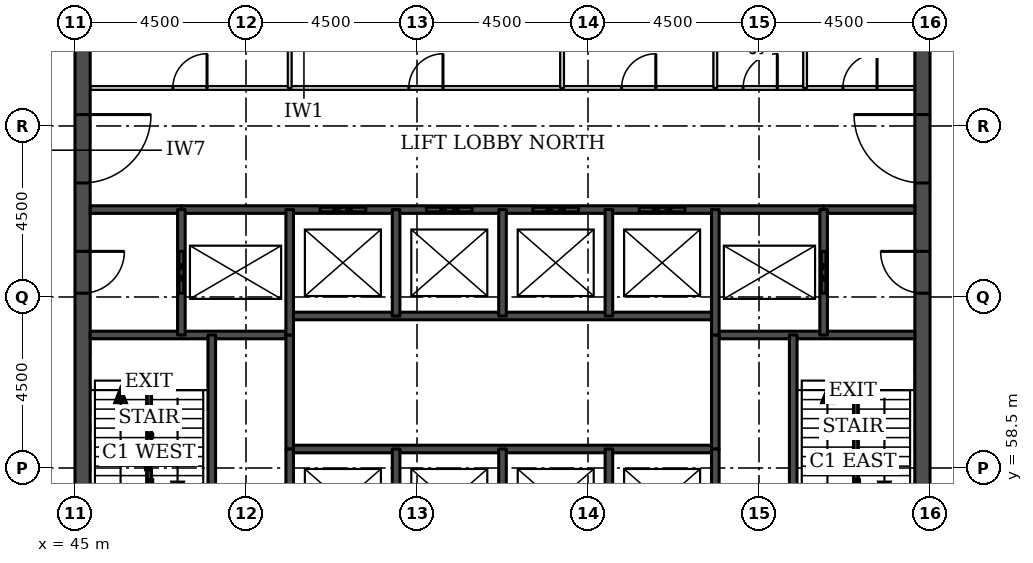
"""IFC4 building model, lengths in metres.
Left out: names, types, materials, properties, quantities, classifications, styles, units other than length and angle.
Written with IfcOpenShell. Run it as: python <this file> out.ifc"""

import sys

from ifc_helpers import new_model, si_unit, direction, frame, frame_2d, origin, place, context, subcontext, project, spatial, rectangle, extrude, element, fill, save


model = new_model("IFC4")
c1 = context("Model", 3, precision=1e-05, world=origin(), true_north=direction((0.0, 1.0)))
c2 = subcontext(c1, "Body", "Model", "MODEL_VIEW")
j1 = project(units=[si_unit("LENGTHUNIT", "METRE"), si_unit("PLANEANGLEUNIT", "RADIAN")], contexts=[c1])
p1 = place(None, origin())
s1 = spatial("IfcSite", under=j1, at=p1, CompositionType="ELEMENT")
p2 = place(p1, origin())
s2 = spatial("IfcBuilding", under=s1, at=p2, CompositionType="ELEMENT")
p3 = place(p2, frame((0.0, 0.0, 199.5)))
s3 = spatial("IfcBuildingStorey", under=s2, at=p3, CompositionType="ELEMENT", Elevation=199.5)
p4 = place(p3, frame((45.2, 49.5, 0.0), z_axis=(0.0, 0.0, 1.0), x_axis=(0.0, 1.0, 0.0)))
e1 = element("IfcWall", 1, at=p4, inside=s3, PredefinedType="SHEAR", context=c2, shape_type="SweptSolid", body=[
    extrude(rectangle(XDim=22.5, YDim=0.4, at=frame_2d((11.25, 0.0))), origin(), (0.0, 0.0, 1.0), 3.7),
])
p5 = place(p4, frame((4.2, 0.0, 0.0)))
e2 = element("IfcOpeningElement", 2, at=p5, cuts=e1, PredefinedType="OPENING", context=c2, shape_type="SweptSolid", body=[
    extrude(rectangle(XDim=1.8, YDim=2.1, at=frame_2d((0.9, 1.05))), frame((0.0, 0.21, 0.0), z_axis=(0.0, -1.0, 0.0), x_axis=(1.0, 0.0, 0.0)), (0.0, 0.0, 1.0), 0.42),
])
p6 = place(p4, frame((6.9, 0.0, 0.0)))
e3 = element("IfcOpeningElement", 3, at=p6, cuts=e1, PredefinedType="OPENING", context=c2, shape_type="SweptSolid", body=[
    extrude(rectangle(XDim=1.1, YDim=2.1, at=frame_2d((0.55, 1.05))), frame((0.0, 0.21, 0.0), z_axis=(0.0, -1.0, 0.0), x_axis=(1.0, 0.0, 0.0)), (0.0, 0.0, 1.0), 0.42),
])
p7 = place(p4, frame((13.6, 0.0, 0.0)))
e4 = element("IfcOpeningElement", 4, at=p7, cuts=e1, PredefinedType="OPENING", context=c2, shape_type="SweptSolid", body=[
    extrude(rectangle(XDim=1.1, YDim=2.1, at=frame_2d((0.55, 1.05))), frame((0.0, 0.21, 0.0), z_axis=(0.0, -1.0, 0.0), x_axis=(1.0, 0.0, 0.0)), (0.0, 0.0, 1.0), 0.42),
])
p8 = place(p4, frame((16.5, 0.0, 0.0)))
e5 = element("IfcOpeningElement", 5, at=p8, cuts=e1, PredefinedType="OPENING", context=c2, shape_type="SweptSolid", body=[
    extrude(rectangle(XDim=1.8, YDim=2.1, at=frame_2d((0.9, 1.05))), frame((0.0, 0.21, 0.0), z_axis=(0.0, -1.0, 0.0), x_axis=(1.0, 0.0, 0.0)), (0.0, 0.0, 1.0), 0.42),
])
p9 = place(p3, frame((67.3, 49.5, 0.0), z_axis=(0.0, 0.0, 1.0), x_axis=(0.0, 1.0, 0.0)))
e6 = element("IfcWall", 6, at=p9, inside=s3, PredefinedType="SHEAR", context=c2, shape_type="SweptSolid", body=[
    extrude(rectangle(XDim=22.5, YDim=0.4, at=frame_2d((11.25, 0.0))), origin(), (0.0, 0.0, 1.0), 3.7),
])
p10 = place(p9, frame((4.2, 0.0, 0.0)))
e7 = element("IfcOpeningElement", 7, at=p10, cuts=e6, PredefinedType="OPENING", context=c2, shape_type="SweptSolid", body=[
    extrude(rectangle(XDim=1.8, YDim=2.1, at=frame_2d((0.9, 1.05))), frame((0.0, 0.21, 0.0), z_axis=(0.0, -1.0, 0.0), x_axis=(1.0, 0.0, 0.0)), (0.0, 0.0, 1.0), 0.42),
])
p11 = place(p9, frame((6.9, 0.0, 0.0)))
e8 = element("IfcOpeningElement", 8, at=p11, cuts=e6, PredefinedType="OPENING", context=c2, shape_type="SweptSolid", body=[
    extrude(rectangle(XDim=1.1, YDim=2.1, at=frame_2d((0.55, 1.05))), frame((0.0, 0.21, 0.0), z_axis=(0.0, -1.0, 0.0), x_axis=(1.0, 0.0, 0.0)), (0.0, 0.0, 1.0), 0.42),
])
p12 = place(p9, frame((13.6, 0.0, 0.0)))
e9 = element("IfcOpeningElement", 9, at=p12, cuts=e6, PredefinedType="OPENING", context=c2, shape_type="SweptSolid", body=[
    extrude(rectangle(XDim=1.1, YDim=2.1, at=frame_2d((0.55, 1.05))), frame((0.0, 0.21, 0.0), z_axis=(0.0, -1.0, 0.0), x_axis=(1.0, 0.0, 0.0)), (0.0, 0.0, 1.0), 0.42),
])
p13 = place(p9, frame((16.5, 0.0, 0.0)))
e10 = element("IfcOpeningElement", 10, at=p13, cuts=e6, PredefinedType="OPENING", context=c2, shape_type="SweptSolid", body=[
    extrude(rectangle(XDim=1.8, YDim=2.1, at=frame_2d((0.9, 1.05))), frame((0.0, 0.21, 0.0), z_axis=(0.0, -1.0, 0.0), x_axis=(1.0, 0.0, 0.0)), (0.0, 0.0, 1.0), 0.42),
])
p14 = place(p3, frame((50.65, 59.0, 0.0), z_axis=(0.0, 0.0, 1.0), x_axis=(1.0, 0.0, 0.0)))
e11 = element("IfcWall", 11, at=p14, inside=s3, PredefinedType="SOLIDWALL", context=c2, shape_type="SweptSolid", body=[
    extrude(rectangle(XDim=11.2, YDim=0.2, at=frame_2d((5.6, 0.0))), origin(), (0.0, 0.0, 1.0), 3.7),
])
for number, where, z_axis, x_axis in (
    (12, (45.4, 62.0, 0.0), (0.0, 0.0, 1.0), (1.0, 0.0, 0.0)),
    (13, (61.85, 62.0, 0.0), (0.0, 0.0, 1.0), (1.0, 0.0, 0.0)),
):
    element("IfcWall", number, at=place(p3, frame(where, z_axis=z_axis, x_axis=x_axis)), inside=s3, PredefinedType="SOLIDWALL", context=c2, shape_type="SweptSolid", body=[
        extrude(rectangle(XDim=5.25, YDim=0.2, at=frame_2d((2.625, 0.0))), origin(), (0.0, 0.0, 1.0), 3.55),
    ])
p15 = place(p3, frame((50.65, 62.5, 0.0), z_axis=(0.0, 0.0, 1.0), x_axis=(1.0, 0.0, 0.0)))
e14 = element("IfcWall", 14, at=p15, inside=s3, PredefinedType="SOLIDWALL", context=c2, shape_type="SweptSolid", body=[
    extrude(rectangle(XDim=11.2, YDim=0.2, at=frame_2d((5.6, 0.0))), origin(), (0.0, 0.0, 1.0), 3.7),
])
for number, where, z_axis, x_axis in (
    (15, (45.4, 65.3, 0.0), (0.0, 0.0, 1.0), (1.0, 0.0, 0.0)),
    (16, (64.7, 65.3, 0.0), (0.0, 0.0, 1.0), (1.0, 0.0, 0.0)),
):
    element("IfcWall", number, at=place(p3, frame(where, z_axis=z_axis, x_axis=x_axis)), inside=s3, PredefinedType="SOLIDWALL", context=c2, shape_type="SweptSolid", body=[
        extrude(rectangle(XDim=2.4, YDim=0.2, at=frame_2d((1.2, 0.0))), origin(), (0.0, 0.0, 1.0), 3.55),
    ])
p16 = place(p3, frame((47.8, 65.3, 0.0), z_axis=(0.0, 0.0, 1.0), x_axis=(1.0, 0.0, 0.0)))
e17 = element("IfcWall", 17, at=p16, inside=s3, PredefinedType="SOLIDWALL", context=c2, shape_type="SweptSolid", body=[
    extrude(rectangle(XDim=16.9, YDim=0.2, at=frame_2d((8.45, 0.0))), origin(), (0.0, 0.0, 1.0), 3.55),
])
p17 = place(p16, frame((3.65, 0.0, 0.0)))
e18 = element("IfcOpeningElement", 18, at=p17, cuts=e17, PredefinedType="OPENING", context=c2, shape_type="SweptSolid", body=[
    extrude(rectangle(XDim=1.2, YDim=2.1, at=frame_2d((0.6, 1.05))), frame((0.0, 0.11, 0.0), z_axis=(0.0, -1.0, 0.0), x_axis=(1.0, 0.0, 0.0)), (0.0, 0.0, 1.0), 0.22),
])
p18 = place(p16, frame((6.45, 0.0, 0.0)))
e19 = element("IfcOpeningElement", 19, at=p18, cuts=e17, PredefinedType="OPENING", context=c2, shape_type="SweptSolid", body=[
    extrude(rectangle(XDim=1.2, YDim=2.1, at=frame_2d((0.6, 1.05))), frame((0.0, 0.11, 0.0), z_axis=(0.0, -1.0, 0.0), x_axis=(1.0, 0.0, 0.0)), (0.0, 0.0, 1.0), 0.22),
])
p19 = place(p16, frame((9.25, 0.0, 0.0)))
e20 = element("IfcOpeningElement", 20, at=p19, cuts=e17, PredefinedType="OPENING", context=c2, shape_type="SweptSolid", body=[
    extrude(rectangle(XDim=1.2, YDim=2.1, at=frame_2d((0.6, 1.05))), frame((0.0, 0.11, 0.0), z_axis=(0.0, -1.0, 0.0), x_axis=(1.0, 0.0, 0.0)), (0.0, 0.0, 1.0), 0.22),
])
p20 = place(p16, frame((12.05, 0.0, 0.0)))
e21 = element("IfcOpeningElement", 21, at=p20, cuts=e17, PredefinedType="OPENING", context=c2, shape_type="SweptSolid", body=[
    extrude(rectangle(XDim=1.2, YDim=2.1, at=frame_2d((0.6, 1.05))), frame((0.0, 0.11, 0.0), z_axis=(0.0, -1.0, 0.0), x_axis=(1.0, 0.0, 0.0)), (0.0, 0.0, 1.0), 0.22),
])
p21 = place(p3, frame((45.4, 68.5, 0.0), z_axis=(0.0, 0.0, 1.0), x_axis=(1.0, 0.0, 0.0)))
e22 = element("IfcWall", 22, at=p21, inside=s3, PredefinedType="PARTITIONING", context=c2, shape_type="SweptSolid", body=[
    extrude(rectangle(XDim=21.7, YDim=0.1, at=frame_2d((10.85, 0.0))), origin(), (0.0, 0.0, 1.0), 3.55),
])
p22 = place(p21, frame((19.806, 0.0, 0.0)))
e23 = element("IfcOpeningElement", 23, at=p22, cuts=e22, PredefinedType="OPENING", context=c2, shape_type="SweptSolid", body=[
    extrude(rectangle(XDim=0.9, YDim=2.1, at=frame_2d((0.45, 1.05))), frame((0.0, 0.06, 0.0), z_axis=(0.0, -1.0, 0.0), x_axis=(1.0, 0.0, 0.0)), (0.0, 0.0, 1.0), 0.12),
])
p23 = place(p21, frame((17.181, 0.0, 0.0)))
e24 = element("IfcOpeningElement", 24, at=p23, cuts=e22, PredefinedType="OPENING", context=c2, shape_type="SweptSolid", body=[
    extrude(rectangle(XDim=0.9, YDim=2.1, at=frame_2d((0.45, 1.05))), frame((0.0, 0.06, 0.0), z_axis=(0.0, -1.0, 0.0), x_axis=(1.0, 0.0, 0.0)), (0.0, 0.0, 1.0), 0.12),
])
p24 = place(p21, frame((2.175, 0.0, 0.0)))
e25 = element("IfcOpeningElement", 25, at=p24, cuts=e22, PredefinedType="OPENING", context=c2, shape_type="SweptSolid", body=[
    extrude(rectangle(XDim=0.9, YDim=2.1, at=frame_2d((0.45, 1.05))), frame((0.0, 0.06, 0.0), z_axis=(0.0, -1.0, 0.0), x_axis=(1.0, 0.0, 0.0)), (0.0, 0.0, 1.0), 0.12),
])
p25 = place(p21, frame((13.984, 0.0, 0.0)))
e26 = element("IfcOpeningElement", 26, at=p25, cuts=e22, PredefinedType="OPENING", context=c2, shape_type="SweptSolid", body=[
    extrude(rectangle(XDim=0.9, YDim=2.1, at=frame_2d((0.45, 1.05))), frame((0.0, 0.06, 0.0), z_axis=(0.0, -1.0, 0.0), x_axis=(1.0, 0.0, 0.0)), (0.0, 0.0, 1.0), 0.12),
])
p26 = place(p21, frame((8.384, 0.0, 0.0)))
e27 = element("IfcOpeningElement", 27, at=p26, cuts=e22, PredefinedType="OPENING", context=c2, shape_type="SweptSolid", body=[
    extrude(rectangle(XDim=0.9, YDim=2.1, at=frame_2d((0.45, 1.05))), frame((0.0, 0.06, 0.0), z_axis=(0.0, -1.0, 0.0), x_axis=(1.0, 0.0, 0.0)), (0.0, 0.0, 1.0), 0.12),
])
p27 = place(p3, frame((47.8, 62.0, 0.0), z_axis=(0.0, 0.0, 1.0), x_axis=(0.0, 1.0, 0.0)))
e28 = element("IfcWall", 28, at=p27, inside=s3, PredefinedType="SOLIDWALL", context=c2, shape_type="SweptSolid", body=[
    extrude(rectangle(XDim=3.3, YDim=0.2, at=frame_2d((1.65, 0.0))), origin(), (0.0, 0.0, 1.0), 3.55),
])
p28 = place(p27, frame((1.1, 0.0, 0.0)))
e29 = element("IfcOpeningElement", 29, at=p28, cuts=e28, PredefinedType="OPENING", context=c2, shape_type="SweptSolid", body=[
    extrude(rectangle(XDim=1.1, YDim=2.1, at=frame_2d((0.55, 1.05))), frame((0.0, 0.11, 0.0), z_axis=(0.0, -1.0, 0.0), x_axis=(1.0, 0.0, 0.0)), (0.0, 0.0, 1.0), 0.22),
])
p29 = place(p3, frame((48.6, 56.2, 0.0), z_axis=(0.0, 0.0, 1.0), x_axis=(0.0, 1.0, 0.0)))
e30 = element("IfcWall", 30, at=p29, inside=s3, PredefinedType="SOLIDWALL", context=c2, shape_type="SweptSolid", body=[
    extrude(rectangle(XDim=5.8, YDim=0.2, at=frame_2d((2.9, 0.0))), origin(), (0.0, 0.0, 1.0), 3.55),
])
p30 = place(p3, frame((50.65, 68.5, 0.0), z_axis=(0.0, 0.0, 1.0), x_axis=(0.0, 1.0, 0.0)))
e31 = element("IfcWall", 31, at=p30, inside=s3, PredefinedType="PARTITIONING", context=c2, shape_type="SweptSolid", body=[
    extrude(rectangle(XDim=3.1, YDim=0.1, at=frame_2d((1.55, 0.0))), origin(), (0.0, 0.0, 1.0), 3.55),
])
p31 = place(p3, frame((50.65, 59.0, 0.0), z_axis=(0.0, 0.0, 1.0), x_axis=(0.0, 1.0, 0.0)))
e32 = element("IfcWall", 32, at=p31, inside=s3, PredefinedType="SOLIDWALL", context=c2, shape_type="SweptSolid", body=[
    extrude(rectangle(XDim=3.0, YDim=0.2, at=frame_2d((1.5, 0.0))), origin(), (0.0, 0.0, 1.0), 3.7),
])
p32 = place(p3, frame((50.65, 56.2, 0.0), z_axis=(0.0, 0.0, 1.0), x_axis=(0.0, 1.0, 0.0)))
e33 = element("IfcWall", 33, at=p32, inside=s3, PredefinedType="SOLIDWALL", context=c2, shape_type="SweptSolid", body=[
    extrude(rectangle(XDim=2.8, YDim=0.2, at=frame_2d((1.4, 0.0))), origin(), (0.0, 0.0, 1.0), 3.55),
])
p33 = place(p3, frame((50.65, 62.0, 0.0), z_axis=(0.0, 0.0, 1.0), x_axis=(0.0, 1.0, 0.0)))
e34 = element("IfcWall", 34, at=p33, inside=s3, PredefinedType="SOLIDWALL", context=c2, shape_type="SweptSolid", body=[
    extrude(rectangle(XDim=3.3, YDim=0.2, at=frame_2d((1.65, 0.0))), origin(), (0.0, 0.0, 1.0), 3.55),
])
for number, where, z_axis, x_axis in (
    (35, (53.45, 56.2, 0.0), (0.0, 0.0, 1.0), (0.0, 1.0, 0.0)),
    (36, (53.45, 62.5, 0.0), (0.0, 0.0, 1.0), (0.0, 1.0, 0.0)),
    (37, (56.25, 56.2, 0.0), (0.0, 0.0, 1.0), (0.0, 1.0, 0.0)),
    (38, (56.25, 62.5, 0.0), (0.0, 0.0, 1.0), (0.0, 1.0, 0.0)),
):
    element("IfcWall", number, at=place(p3, frame(where, z_axis=z_axis, x_axis=x_axis)), inside=s3, PredefinedType="SOLIDWALL", context=c2, shape_type="SweptSolid", body=[
        extrude(rectangle(XDim=2.8, YDim=0.2, at=frame_2d((1.4, 0.0))), origin(), (0.0, 0.0, 1.0), 3.55),
    ])
p34 = place(p3, frame((57.818, 68.5, 0.0), z_axis=(0.0, 0.0, 1.0), x_axis=(0.0, 1.0, 0.0)))
e39 = element("IfcWall", 39, at=p34, inside=s3, PredefinedType="PARTITIONING", context=c2, shape_type="SweptSolid", body=[
    extrude(rectangle(XDim=3.1, YDim=0.1, at=frame_2d((1.55, 0.0))), origin(), (0.0, 0.0, 1.0), 3.55),
])
for number, where, z_axis, x_axis in (
    (40, (59.05, 56.2, 0.0), (0.0, 0.0, 1.0), (0.0, 1.0, 0.0)),
    (41, (59.05, 62.5, 0.0), (0.0, 0.0, 1.0), (0.0, 1.0, 0.0)),
):
    element("IfcWall", number, at=place(p3, frame(where, z_axis=z_axis, x_axis=x_axis)), inside=s3, PredefinedType="SOLIDWALL", context=c2, shape_type="SweptSolid", body=[
        extrude(rectangle(XDim=2.8, YDim=0.2, at=frame_2d((1.4, 0.0))), origin(), (0.0, 0.0, 1.0), 3.55),
    ])
p35 = place(p3, frame((61.85, 68.5, 0.0), z_axis=(0.0, 0.0, 1.0), x_axis=(0.0, 1.0, 0.0)))
e42 = element("IfcWall", 42, at=p35, inside=s3, PredefinedType="PARTITIONING", context=c2, shape_type="SweptSolid", body=[
    extrude(rectangle(XDim=3.1, YDim=0.1, at=frame_2d((1.55, 0.0))), origin(), (0.0, 0.0, 1.0), 3.55),
])
p36 = place(p3, frame((61.85, 59.0, 0.0), z_axis=(0.0, 0.0, 1.0), x_axis=(0.0, 1.0, 0.0)))
e43 = element("IfcWall", 43, at=p36, inside=s3, PredefinedType="SOLIDWALL", context=c2, shape_type="SweptSolid", body=[
    extrude(rectangle(XDim=3.0, YDim=0.2, at=frame_2d((1.5, 0.0))), origin(), (0.0, 0.0, 1.0), 3.7),
])
p37 = place(p3, frame((61.85, 56.2, 0.0), z_axis=(0.0, 0.0, 1.0), x_axis=(0.0, 1.0, 0.0)))
e44 = element("IfcWall", 44, at=p37, inside=s3, PredefinedType="SOLIDWALL", context=c2, shape_type="SweptSolid", body=[
    extrude(rectangle(XDim=2.8, YDim=0.2, at=frame_2d((1.4, 0.0))), origin(), (0.0, 0.0, 1.0), 3.55),
])
p38 = place(p3, frame((61.85, 62.0, 0.0), z_axis=(0.0, 0.0, 1.0), x_axis=(0.0, 1.0, 0.0)))
e45 = element("IfcWall", 45, at=p38, inside=s3, PredefinedType="SOLIDWALL", context=c2, shape_type="SweptSolid", body=[
    extrude(rectangle(XDim=3.3, YDim=0.2, at=frame_2d((1.65, 0.0))), origin(), (0.0, 0.0, 1.0), 3.55),
])
p39 = place(p3, frame((63.9, 56.2, 0.0), z_axis=(0.0, 0.0, 1.0), x_axis=(0.0, 1.0, 0.0)))
e46 = element("IfcWall", 46, at=p39, inside=s3, PredefinedType="SOLIDWALL", context=c2, shape_type="SweptSolid", body=[
    extrude(rectangle(XDim=5.8, YDim=0.2, at=frame_2d((2.9, 0.0))), origin(), (0.0, 0.0, 1.0), 3.55),
])
p40 = place(p3, frame((64.212, 68.5, 0.0), z_axis=(0.0, 0.0, 1.0), x_axis=(0.0, 1.0, 0.0)))
e47 = element("IfcWall", 47, at=p40, inside=s3, PredefinedType="PARTITIONING", context=c2, shape_type="SweptSolid", body=[
    extrude(rectangle(XDim=3.1, YDim=0.1, at=frame_2d((1.55, 0.0))), origin(), (0.0, 0.0, 1.0), 3.55),
])
p41 = place(p3, frame((64.7, 62.0, 0.0), z_axis=(0.0, 0.0, 1.0), x_axis=(0.0, 1.0, 0.0)))
e48 = element("IfcWall", 48, at=p41, inside=s3, PredefinedType="SOLIDWALL", context=c2, shape_type="SweptSolid", body=[
    extrude(rectangle(XDim=3.3, YDim=0.2, at=frame_2d((1.65, 0.0))), origin(), (0.0, 0.0, 1.0), 3.55),
])
p42 = place(p41, frame((1.1, 0.0, 0.0)))
e49 = element("IfcOpeningElement", 49, at=p42, cuts=e48, PredefinedType="OPENING", context=c2, shape_type="SweptSolid", body=[
    extrude(rectangle(XDim=1.1, YDim=2.1, at=frame_2d((0.55, 1.05))), frame((0.0, 0.11, 0.0), z_axis=(0.0, -1.0, 0.0), x_axis=(1.0, 0.0, 0.0)), (0.0, 0.0, 1.0), 0.22),
])
p43 = place(p17, origin())
e50 = element("IfcDoor", 50, at=p43, inside=s3, OperationType="DOUBLE_DOOR_SLIDING", PredefinedType="DOOR", context=c2, shape_type="SweptSolid", body=[
    extrude(rectangle(XDim=1.2, YDim=2.1, at=frame_2d((0.6, 1.05))), frame((0.0, 0.025, 0.0), z_axis=(0.0, -1.0, 0.0), x_axis=(1.0, 0.0, 0.0)), (0.0, 0.0, 1.0), 0.05),
])
fill(e18, e50)
p44 = place(p18, origin())
e51 = element("IfcDoor", 51, at=p44, inside=s3, OperationType="DOUBLE_DOOR_SLIDING", PredefinedType="DOOR", context=c2, shape_type="SweptSolid", body=[
    extrude(rectangle(XDim=1.2, YDim=2.1, at=frame_2d((0.6, 1.05))), frame((0.0, 0.025, 0.0), z_axis=(0.0, -1.0, 0.0), x_axis=(1.0, 0.0, 0.0)), (0.0, 0.0, 1.0), 0.05),
])
fill(e19, e51)
p45 = place(p19, origin())
e52 = element("IfcDoor", 52, at=p45, inside=s3, OperationType="DOUBLE_DOOR_SLIDING", PredefinedType="DOOR", context=c2, shape_type="SweptSolid", body=[
    extrude(rectangle(XDim=1.2, YDim=2.1, at=frame_2d((0.6, 1.05))), frame((0.0, 0.025, 0.0), z_axis=(0.0, -1.0, 0.0), x_axis=(1.0, 0.0, 0.0)), (0.0, 0.0, 1.0), 0.05),
])
fill(e20, e52)
p46 = place(p20, origin())
e53 = element("IfcDoor", 53, at=p46, inside=s3, OperationType="DOUBLE_DOOR_SLIDING", PredefinedType="DOOR", context=c2, shape_type="SweptSolid", body=[
    extrude(rectangle(XDim=1.2, YDim=2.1, at=frame_2d((0.6, 1.05))), frame((0.0, 0.025, 0.0), z_axis=(0.0, -1.0, 0.0), x_axis=(1.0, 0.0, 0.0)), (0.0, 0.0, 1.0), 0.05),
])
fill(e21, e53)
p47 = place(p28, origin())
e54 = element("IfcDoor", 54, at=p47, inside=s3, OperationType="DOUBLE_DOOR_SLIDING", PredefinedType="DOOR", context=c2, shape_type="SweptSolid", body=[
    extrude(rectangle(XDim=1.1, YDim=2.1, at=frame_2d((0.55, 1.05))), frame((0.0, 0.025, 0.0), z_axis=(0.0, -1.0, 0.0), x_axis=(1.0, 0.0, 0.0)), (0.0, 0.0, 1.0), 0.05),
])
fill(e29, e54)
p48 = place(p42, origin())
e55 = element("IfcDoor", 55, at=p48, inside=s3, OperationType="DOUBLE_DOOR_SLIDING", PredefinedType="DOOR", context=c2, shape_type="SweptSolid", body=[
    extrude(rectangle(XDim=1.1, YDim=2.1, at=frame_2d((0.55, 1.05))), frame((0.0, 0.025, 0.0), z_axis=(0.0, -1.0, 0.0), x_axis=(1.0, 0.0, 0.0)), (0.0, 0.0, 1.0), 0.05),
])
fill(e49, e55)
p49 = place(p7, frame((1.1, 0.0, 0.0), z_axis=(0.0, 0.0, 1.0), x_axis=(-1.0, 0.0, 0.0)))
e56 = element("IfcDoor", 56, at=p49, inside=s3, OperationType="SINGLE_SWING_LEFT", PredefinedType="DOOR", context=c2, shape_type="SweptSolid", body=[
    extrude(rectangle(XDim=1.1, YDim=2.1, at=frame_2d((0.55, 1.05))), frame((0.0, 0.025, 0.0), z_axis=(0.0, -1.0, 0.0), x_axis=(1.0, 0.0, 0.0)), (0.0, 0.0, 1.0), 0.05),
])
fill(e4, e56)
p50 = place(p8, frame((1.8, 0.0, 0.0), z_axis=(0.0, 0.0, 1.0), x_axis=(-1.0, 0.0, 0.0)))
e57 = element("IfcDoor", 57, at=p50, inside=s3, OperationType="SINGLE_SWING_LEFT", PredefinedType="DOOR", context=c2, shape_type="SweptSolid", body=[
    extrude(rectangle(XDim=1.8, YDim=2.1, at=frame_2d((0.9, 1.05))), frame((0.0, 0.025, 0.0), z_axis=(0.0, -1.0, 0.0), x_axis=(1.0, 0.0, 0.0)), (0.0, 0.0, 1.0), 0.05),
])
fill(e5, e57)
p51 = place(p12, origin())
e58 = element("IfcDoor", 58, at=p51, inside=s3, OperationType="SINGLE_SWING_RIGHT", PredefinedType="DOOR", context=c2, shape_type="SweptSolid", body=[
    extrude(rectangle(XDim=1.1, YDim=2.1, at=frame_2d((0.55, 1.05))), frame((0.0, 0.025, 0.0), z_axis=(0.0, -1.0, 0.0), x_axis=(1.0, 0.0, 0.0)), (0.0, 0.0, 1.0), 0.05),
])
fill(e9, e58)
p52 = place(p13, origin())
e59 = element("IfcDoor", 59, at=p52, inside=s3, OperationType="SINGLE_SWING_RIGHT", PredefinedType="DOOR", context=c2, shape_type="SweptSolid", body=[
    extrude(rectangle(XDim=1.8, YDim=2.1, at=frame_2d((0.9, 1.05))), frame((0.0, 0.025, 0.0), z_axis=(0.0, -1.0, 0.0), x_axis=(1.0, 0.0, 0.0)), (0.0, 0.0, 1.0), 0.05),
])
fill(e10, e59)
p53 = place(p22, origin())
e60 = element("IfcDoor", 60, at=p53, inside=s3, OperationType="SINGLE_SWING_RIGHT", PredefinedType="DOOR", context=c2, shape_type="SweptSolid", body=[
    extrude(rectangle(XDim=0.9, YDim=2.1, at=frame_2d((0.45, 1.05))), frame((0.0, 0.025, 0.0), z_axis=(0.0, -1.0, 0.0), x_axis=(1.0, 0.0, 0.0)), (0.0, 0.0, 1.0), 0.05),
])
fill(e23, e60)
p54 = place(p23, origin())
e61 = element("IfcDoor", 61, at=p54, inside=s3, OperationType="SINGLE_SWING_RIGHT", PredefinedType="DOOR", context=c2, shape_type="SweptSolid", body=[
    extrude(rectangle(XDim=0.9, YDim=2.1, at=frame_2d((0.45, 1.05))), frame((0.0, 0.025, 0.0), z_axis=(0.0, -1.0, 0.0), x_axis=(1.0, 0.0, 0.0)), (0.0, 0.0, 1.0), 0.05),
])
fill(e24, e61)
p55 = place(p24, origin())
e62 = element("IfcDoor", 62, at=p55, inside=s3, OperationType="SINGLE_SWING_RIGHT", PredefinedType="DOOR", context=c2, shape_type="SweptSolid", body=[
    extrude(rectangle(XDim=0.9, YDim=2.1, at=frame_2d((0.45, 1.05))), frame((0.0, 0.025, 0.0), z_axis=(0.0, -1.0, 0.0), x_axis=(1.0, 0.0, 0.0)), (0.0, 0.0, 1.0), 0.05),
])
fill(e25, e62)
p56 = place(p25, origin())
e63 = element("IfcDoor", 63, at=p56, inside=s3, OperationType="SINGLE_SWING_RIGHT", PredefinedType="DOOR", context=c2, shape_type="SweptSolid", body=[
    extrude(rectangle(XDim=0.9, YDim=2.1, at=frame_2d((0.45, 1.05))), frame((0.0, 0.025, 0.0), z_axis=(0.0, -1.0, 0.0), x_axis=(1.0, 0.0, 0.0)), (0.0, 0.0, 1.0), 0.05),
])
fill(e26, e63)
p57 = place(p26, origin())
e64 = element("IfcDoor", 64, at=p57, inside=s3, OperationType="SINGLE_SWING_RIGHT", PredefinedType="DOOR", context=c2, shape_type="SweptSolid", body=[
    extrude(rectangle(XDim=0.9, YDim=2.1, at=frame_2d((0.45, 1.05))), frame((0.0, 0.025, 0.0), z_axis=(0.0, -1.0, 0.0), x_axis=(1.0, 0.0, 0.0)), (0.0, 0.0, 1.0), 0.05),
])
fill(e27, e64)
save(model, sys.argv[1])
